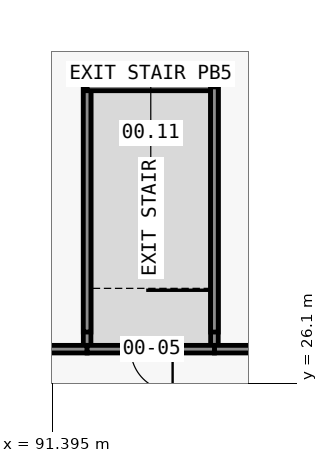
"""IFC4 building model, lengths in metres.
Left out: names, types, materials, properties, quantities, classifications, styles, units other than length and angle.
Written with IfcOpenShell. Run it as: python <this file> out.ifc"""

import sys

from ifc_helpers import new_model, si_unit, direction, frame, frame_2d, origin, place, context, subcontext, project, spatial, rectangle, extrude, element, fill, save


model = new_model("IFC4")
c1 = context("Model", 3, precision=1e-05, world=origin(), true_north=direction((0.0, 1.0)))
c2 = subcontext(c1, "Body", "Model", "MODEL_VIEW")
j1 = project(units=[si_unit("LENGTHUNIT", "METRE"), si_unit("PLANEANGLEUNIT", "RADIAN")], contexts=[c1])
p1 = place(None, origin())
s1 = spatial("IfcSite", under=j1, at=p1, CompositionType="ELEMENT")
p2 = place(p1, origin())
s2 = spatial("IfcBuilding", under=s1, at=p2, CompositionType="ELEMENT")
p3 = place(p2, origin())
s3 = spatial("IfcBuildingStorey", under=s2, at=p3, CompositionType="ELEMENT", Elevation=0.0)
p4 = place(p3, frame((92.3, 27.0, 0.0), z_axis=(0.0, 0.0, 1.0), x_axis=(0.0, 1.0, 0.0)))
e1 = element("IfcWall", 1, at=p4, inside=s3, PredefinedType="PARTITIONING", context=c2, shape_type="SweptSolid", body=[
    extrude(rectangle(XDim=6.9, YDim=0.2, at=frame_2d((3.45, 0.0))), origin(), (0.0, 0.0, 1.0), 6.95),
])
p5 = place(p3, frame((92.3, 33.9, 0.0), z_axis=(0.0, 0.0, 1.0), x_axis=(1.0, 0.0, 0.0)))
e2 = element("IfcWall", 2, at=p5, inside=s3, PredefinedType="PARTITIONING", context=c2, shape_type="SweptSolid", body=[
    extrude(rectangle(XDim=3.35, YDim=0.2, at=frame_2d((1.675, 0.0))), origin(), (0.0, 0.0, 1.0), 7.65),
])
p6 = place(p3, frame((95.65, 33.9, 0.0), z_axis=(0.0, 0.0, 1.0), x_axis=(0.0, -1.0, 0.0)))
e3 = element("IfcWall", 3, at=p6, inside=s3, PredefinedType="PARTITIONING", context=c2, shape_type="SweptSolid", body=[
    extrude(rectangle(XDim=6.9, YDim=0.2, at=frame_2d((3.45, 0.0))), origin(), (0.0, 0.0, 1.0), 6.95),
])
p7 = place(p3, frame((95.65, 27.0, 0.0), z_axis=(0.0, 0.0, 1.0), x_axis=(1.0, 0.0, 0.0)))
e4 = element("IfcWall", 4, at=p7, inside=s3, PredefinedType="PARTITIONING", context=c2, shape_type="SweptSolid", body=[
    extrude(rectangle(XDim=2.65, YDim=0.2, at=frame_2d((1.325, 0.0))), origin(), (0.0, 0.0, 1.0), 6.95),
])
p8 = place(p3, frame((90.7, 27.0, 0.0), z_axis=(0.0, 0.0, 1.0), x_axis=(1.0, 0.0, 0.0)))
e5 = element("IfcWall", 5, at=p8, inside=s3, PredefinedType="PARTITIONING", context=c2, shape_type="SweptSolid", body=[
    extrude(rectangle(XDim=1.6, YDim=0.2, at=frame_2d((0.8, 0.0))), origin(), (0.0, 0.0, 1.0), 6.95),
])
p9 = place(p3, frame((95.65, 27.0, 0.0), z_axis=(0.0, 0.0, 1.0), x_axis=(-1.0, 0.0, 0.0)))
e6 = element("IfcWall", 6, at=p9, inside=s3, PredefinedType="PARTITIONING", context=c2, shape_type="SweptSolid", body=[
    extrude(rectangle(XDim=3.35, YDim=0.2, at=frame_2d((1.675, 0.0))), origin(), (0.0, 0.0, 1.0), 6.95),
])
p10 = place(p9, frame((1.1, 0.0, 0.0)))
e7 = element("IfcOpeningElement", 7, at=p10, cuts=e6, PredefinedType="OPENING", context=c2, shape_type="SweptSolid", body=[
    extrude(rectangle(XDim=1.1, YDim=2.1, at=frame_2d((0.55, 1.05))), frame((0.0, 0.11, 0.0), z_axis=(0.0, -1.0, 0.0), x_axis=(1.0, 0.0, 0.0)), (0.0, 0.0, 1.0), 0.22),
])
for number, where, z_axis, x_axis in (
    (8, (92.3, 27.45, 6.95), (0.0, 0.0, 1.0), (0.0, 1.0, 0.0)),
    (9, (95.65, 33.9, 6.95), (0.0, 0.0, 1.0), (0.0, -1.0, 0.0)),
):
    element("IfcWall", number, at=place(p3, frame(where, z_axis=z_axis, x_axis=x_axis)), inside=s3, PredefinedType="PARTITIONING", context=c2, shape_type="SweptSolid", body=[
        extrude(rectangle(XDim=6.45, YDim=0.2, at=frame_2d((3.225, 0.0))), origin(), (0.0, 0.0, 1.0), 0.7),
    ])
p11 = place(p10, origin())
e10 = element("IfcDoor", 10, at=p11, inside=s3, OperationType="SINGLE_SWING_LEFT", PredefinedType="DOOR", context=c2, shape_type="SweptSolid", body=[
    extrude(rectangle(XDim=1.1, YDim=2.1, at=frame_2d((0.55, 1.05))), frame((0.0, 0.025, 0.0), z_axis=(0.0, -1.0, 0.0), x_axis=(1.0, 0.0, 0.0)), (0.0, 0.0, 1.0), 0.05),
])
fill(e7, e10)
save(model, sys.argv[1])
